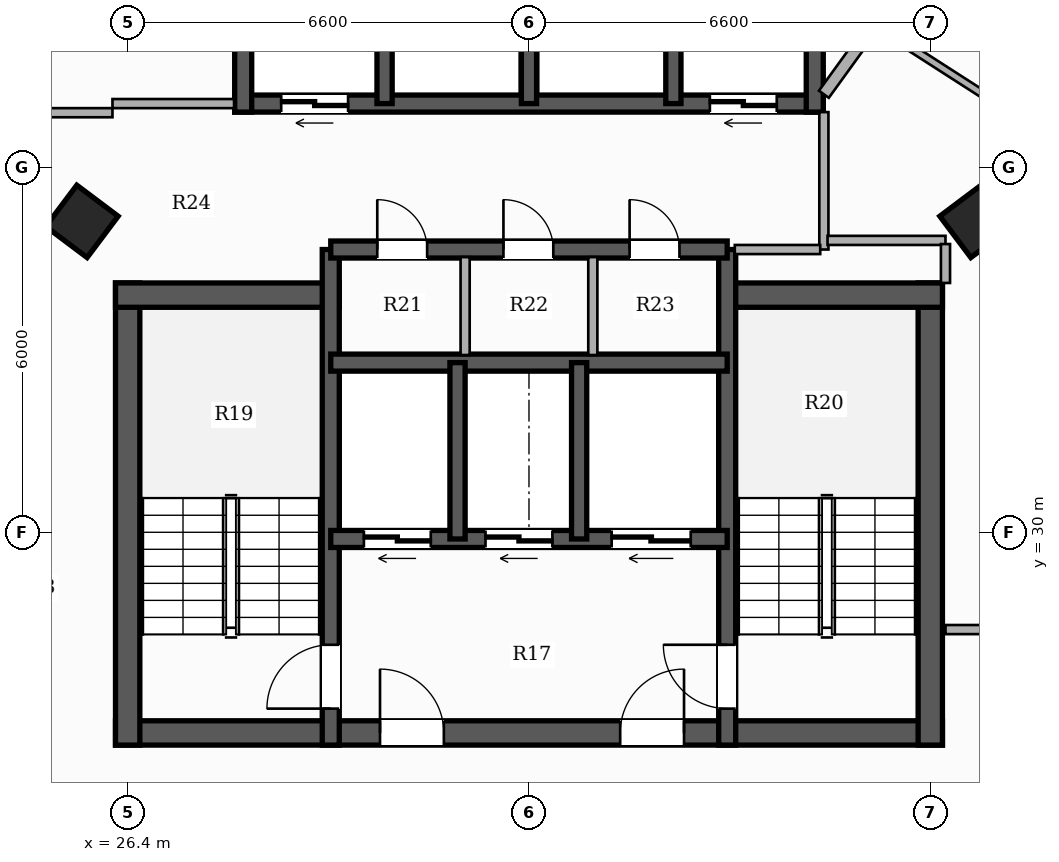
"""IFC4 building model, lengths in metres.
Left out: names, types, materials, properties, quantities, classifications, styles, units other than length and angle.
Written with IfcOpenShell. Run it as: python <this file> out.ifc"""

import sys

from ifc_helpers import new_model, si_unit, direction, frame, frame_2d, origin, origin_2d, place, context, subcontext, project, spatial, rectangle, hollow_rectangle, extrude, element, fill, save


model = new_model("IFC4")
c1 = context("Model", 3, precision=1e-05, world=origin(), true_north=direction((0.0, 1.0)))
c2 = subcontext(c1, "Body", "Model", "MODEL_VIEW")
j1 = project(units=[si_unit("LENGTHUNIT", "METRE"), si_unit("PLANEANGLEUNIT", "RADIAN")], contexts=[c1])
p1 = place(None, origin())
s1 = spatial("IfcSite", under=j1, at=p1, CompositionType="ELEMENT")
p2 = place(p1, origin())
s2 = spatial("IfcBuilding", under=s1, at=p2, CompositionType="ELEMENT")
p3 = place(p2, frame((0.0, 0.0, 177.05)))
s3 = spatial("IfcBuildingStorey", under=s2, at=p3, CompositionType="ELEMENT", Elevation=177.05)
p4 = place(p3, frame((26.2, 26.7, 0.0), z_axis=(0.0, 0.0, 1.0), x_axis=(1.0, 0.0, 0.0)))
e1 = element("IfcWall", 1, at=p4, inside=s3, PredefinedType="SHEAR", context=c2, shape_type="SweptSolid", body=[
    extrude(rectangle(XDim=13.6, YDim=0.4, at=frame_2d((6.8, 0.0))), origin(), (0.0, 0.0, 1.0), 3.3),
])
p5 = place(p4, frame((4.35, 0.0, 0.0)))
e2 = element("IfcOpeningElement", 2, at=p5, cuts=e1, PredefinedType="OPENING", context=c2, shape_type="SweptSolid", body=[
    extrude(rectangle(XDim=1.05, YDim=2.15, at=frame_2d((0.525, 1.075))), frame((0.0, 0.21, 0.0), z_axis=(0.0, -1.0, 0.0), x_axis=(1.0, 0.0, 0.0)), (0.0, 0.0, 1.0), 0.42),
])
p6 = place(p4, frame((8.3, 0.0, 0.0)))
e3 = element("IfcOpeningElement", 3, at=p6, cuts=e1, PredefinedType="OPENING", context=c2, shape_type="SweptSolid", body=[
    extrude(rectangle(XDim=1.05, YDim=2.15, at=frame_2d((0.525, 1.075))), frame((0.0, 0.21, 0.0), z_axis=(0.0, -1.0, 0.0), x_axis=(1.0, 0.0, 0.0)), (0.0, 0.0, 1.0), 0.42),
])
p7 = place(p3, frame((26.4, 26.5, 0.0), z_axis=(0.0, 0.0, 1.0), x_axis=(0.0, 1.0, 0.0)))
e4 = element("IfcWall", 4, at=p7, inside=s3, PredefinedType="SHEAR", context=c2, shape_type="SweptSolid", body=[
    extrude(rectangle(XDim=7.6, YDim=0.4, at=frame_2d((3.8, 0.0))), origin(), (0.0, 0.0, 1.0), 3.3),
])
p8 = place(p3, frame((26.2, 33.9, 0.0), z_axis=(0.0, 0.0, 1.0), x_axis=(1.0, 0.0, 0.0)))
e5 = element("IfcWall", 5, at=p8, inside=s3, PredefinedType="SHEAR", context=c2, shape_type="SweptSolid", body=[
    extrude(rectangle(XDim=3.68, YDim=0.4, at=frame_2d((1.84, 0.0))), origin(), (0.0, 0.0, 1.0), 3.3),
])
p9 = place(p3, frame((39.6, 26.5, 0.0), z_axis=(0.0, 0.0, 1.0), x_axis=(0.0, 1.0, 0.0)))
e6 = element("IfcWall", 6, at=p9, inside=s3, PredefinedType="SHEAR", context=c2, shape_type="SweptSolid", body=[
    extrude(rectangle(XDim=7.6, YDim=0.4, at=frame_2d((3.8, 0.0))), origin(), (0.0, 0.0, 1.0), 3.3),
])
p10 = place(p3, frame((36.12, 33.9, 0.0), z_axis=(0.0, 0.0, 1.0), x_axis=(1.0, 0.0, 0.0)))
e7 = element("IfcWall", 7, at=p10, inside=s3, PredefinedType="SHEAR", context=c2, shape_type="SweptSolid", body=[
    extrude(rectangle(XDim=3.68, YDim=0.4, at=frame_2d((1.84, 0.0))), origin(), (0.0, 0.0, 1.0), 3.3),
])
p11 = place(p3, frame((29.74, 26.5, 0.0), z_axis=(0.0, 0.0, 1.0), x_axis=(0.0, 1.0, 0.0)))
e8 = element("IfcWall", 8, at=p11, inside=s3, PredefinedType="SHEAR", context=c2, shape_type="SweptSolid", body=[
    extrude(rectangle(XDim=8.15, YDim=0.28, at=frame_2d((4.075, 0.0))), origin(), (0.0, 0.0, 1.0), 3.3),
])
p12 = place(p11, frame((0.6, 0.0, 0.0)))
e9 = element("IfcOpeningElement", 9, at=p12, cuts=e8, PredefinedType="OPENING", context=c2, shape_type="SweptSolid", body=[
    extrude(rectangle(XDim=1.05, YDim=2.15, at=frame_2d((0.525, 1.075))), frame((0.0, 0.15, 0.0), z_axis=(0.0, -1.0, 0.0), x_axis=(1.0, 0.0, 0.0)), (0.0, 0.0, 1.0), 0.3),
])
p13 = place(p3, frame((36.26, 26.5, 0.0), z_axis=(0.0, 0.0, 1.0), x_axis=(0.0, 1.0, 0.0)))
e10 = element("IfcWall", 10, at=p13, inside=s3, PredefinedType="SHEAR", context=c2, shape_type="SweptSolid", body=[
    extrude(rectangle(XDim=8.15, YDim=0.28, at=frame_2d((4.075, 0.0))), origin(), (0.0, 0.0, 1.0), 3.3),
])
p14 = place(p13, frame((0.6, 0.0, 0.0)))
e11 = element("IfcOpeningElement", 11, at=p14, cuts=e10, PredefinedType="OPENING", context=c2, shape_type="SweptSolid", body=[
    extrude(rectangle(XDim=1.05, YDim=2.15, at=frame_2d((0.525, 1.075))), frame((0.0, 0.15, 0.0), z_axis=(0.0, -1.0, 0.0), x_axis=(1.0, 0.0, 0.0)), (0.0, 0.0, 1.0), 0.3),
])
p15 = place(p3, frame((36.26, 29.89, 0.0), z_axis=(0.0, 0.0, 1.0), x_axis=(-1.0, 0.0, 0.0)))
e12 = element("IfcWall", 12, at=p15, inside=s3, PredefinedType="SHEAR", context=c2, shape_type="SweptSolid", body=[
    extrude(rectangle(XDim=6.52, YDim=0.28, at=frame_2d((3.26, 0.0))), origin(), (0.0, 0.0, 1.0), 3.3),
])
p16 = place(p15, frame((4.875, 0.0, 0.0)))
e13 = element("IfcOpeningElement", 13, at=p16, cuts=e12, PredefinedType="OPENING", context=c2, shape_type="SweptSolid", body=[
    extrude(rectangle(XDim=1.1, YDim=2.2, at=frame_2d((0.55, 1.1))), frame((0.0, 0.15, 0.0), z_axis=(0.0, -1.0, 0.0), x_axis=(1.0, 0.0, 0.0)), (0.0, 0.0, 1.0), 0.3),
])
p17 = place(p15, frame((2.875, 0.0, 0.0)))
e14 = element("IfcOpeningElement", 14, at=p17, cuts=e12, PredefinedType="OPENING", context=c2, shape_type="SweptSolid", body=[
    extrude(rectangle(XDim=1.1, YDim=2.2, at=frame_2d((0.55, 1.1))), frame((0.0, 0.15, 0.0), z_axis=(0.0, -1.0, 0.0), x_axis=(1.0, 0.0, 0.0)), (0.0, 0.0, 1.0), 0.3),
])
p18 = place(p15, frame((0.6, 0.0, 0.0)))
e15 = element("IfcOpeningElement", 15, at=p18, cuts=e12, PredefinedType="OPENING", context=c2, shape_type="SweptSolid", body=[
    extrude(rectangle(XDim=1.3, YDim=2.2, at=frame_2d((0.65, 1.1))), frame((0.0, 0.15, 0.0), z_axis=(0.0, -1.0, 0.0), x_axis=(1.0, 0.0, 0.0)), (0.0, 0.0, 1.0), 0.3),
])
p19 = place(p3, frame((29.74, 32.79, 0.0), z_axis=(0.0, 0.0, 1.0), x_axis=(1.0, 0.0, 0.0)))
e16 = element("IfcWall", 16, at=p19, inside=s3, PredefinedType="SHEAR", context=c2, shape_type="SweptSolid", body=[
    extrude(rectangle(XDim=6.52, YDim=0.28, at=frame_2d((3.26, 0.0))), origin(), (0.0, 0.0, 1.0), 3.3),
])
for number, where, z_axis, x_axis in (
    (17, (31.825, 29.89, 0.0), (0.0, 0.0, 1.0), (0.0, 1.0, 0.0)),
    (18, (33.825, 29.89, 0.0), (0.0, 0.0, 1.0), (0.0, 1.0, 0.0)),
):
    element("IfcWall", number, at=place(p3, frame(where, z_axis=z_axis, x_axis=x_axis)), inside=s3, PredefinedType="SHEAR", context=c2, shape_type="SweptSolid", body=[
        extrude(rectangle(XDim=2.9, YDim=0.25, at=frame_2d((1.45, 0.0))), origin(), (0.0, 0.0, 1.0), 3.3),
    ])
p20 = place(p3, frame((29.74, 34.65, 0.0), z_axis=(0.0, 0.0, 1.0), x_axis=(1.0, 0.0, 0.0)))
e19 = element("IfcWall", 19, at=p20, inside=s3, PredefinedType="SHEAR", context=c2, shape_type="SweptSolid", body=[
    extrude(rectangle(XDim=6.52, YDim=0.28, at=frame_2d((3.26, 0.0))), origin(), (0.0, 0.0, 1.0), 3.3),
])
p21 = place(p20, frame((0.765, 0.0, 0.0)))
e20 = element("IfcOpeningElement", 20, at=p21, cuts=e19, PredefinedType="OPENING", context=c2, shape_type="SweptSolid", body=[
    extrude(rectangle(XDim=0.82, YDim=2.1, at=frame_2d((0.41, 1.05))), frame((0.0, 0.15, 0.0), z_axis=(0.0, -1.0, 0.0), x_axis=(1.0, 0.0, 0.0)), (0.0, 0.0, 1.0), 0.3),
])
p22 = place(p20, frame((2.84, 0.0, 0.0)))
e21 = element("IfcOpeningElement", 21, at=p22, cuts=e19, PredefinedType="OPENING", context=c2, shape_type="SweptSolid", body=[
    extrude(rectangle(XDim=0.82, YDim=2.1, at=frame_2d((0.41, 1.05))), frame((0.0, 0.15, 0.0), z_axis=(0.0, -1.0, 0.0), x_axis=(1.0, 0.0, 0.0)), (0.0, 0.0, 1.0), 0.3),
])
p23 = place(p20, frame((4.915, 0.0, 0.0)))
e22 = element("IfcOpeningElement", 22, at=p23, cuts=e19, PredefinedType="OPENING", context=c2, shape_type="SweptSolid", body=[
    extrude(rectangle(XDim=0.82, YDim=2.1, at=frame_2d((0.41, 1.05))), frame((0.0, 0.15, 0.0), z_axis=(0.0, -1.0, 0.0), x_axis=(1.0, 0.0, 0.0)), (0.0, 0.0, 1.0), 0.3),
])
p24 = place(p3, frame((37.84, 37.05, 0.0), z_axis=(0.0, 0.0, 1.0), x_axis=(-1.0, 0.0, 0.0)))
e23 = element("IfcWall", 23, at=p24, inside=s3, PredefinedType="SHEAR", context=c2, shape_type="SweptSolid", body=[
    extrude(rectangle(XDim=9.68, YDim=0.28, at=frame_2d((4.84, 0.0))), origin(), (0.0, 0.0, 1.0), 3.3),
])
p25 = place(p24, frame((7.815, 0.0, 0.0)))
e24 = element("IfcOpeningElement", 24, at=p25, cuts=e23, PredefinedType="OPENING", context=c2, shape_type="SweptSolid", body=[
    extrude(rectangle(XDim=1.1, YDim=2.2, at=frame_2d((0.55, 1.1))), frame((0.0, 0.15, 0.0), z_axis=(0.0, -1.0, 0.0), x_axis=(1.0, 0.0, 0.0)), (0.0, 0.0, 1.0), 0.3),
])
p26 = place(p24, frame((0.765, 0.0, 0.0)))
e25 = element("IfcOpeningElement", 25, at=p26, cuts=e23, PredefinedType="OPENING", context=c2, shape_type="SweptSolid", body=[
    extrude(rectangle(XDim=1.1, YDim=2.2, at=frame_2d((0.55, 1.1))), frame((0.0, 0.15, 0.0), z_axis=(0.0, -1.0, 0.0), x_axis=(1.0, 0.0, 0.0)), (0.0, 0.0, 1.0), 0.3),
])
for number, where, z_axis, x_axis in (
    (26, (28.3, 36.91, 0.0), (0.0, 0.0, 1.0), (0.0, 1.0, 0.0)),
    (27, (37.7, 36.91, 0.0), (0.0, 0.0, 1.0), (0.0, 1.0, 0.0)),
):
    element("IfcWall", number, at=place(p3, frame(where, z_axis=z_axis, x_axis=x_axis)), inside=s3, PredefinedType="SHEAR", context=c2, shape_type="SweptSolid", body=[
        extrude(rectangle(XDim=2.83, YDim=0.28, at=frame_2d((1.415, 0.0))), origin(), (0.0, 0.0, 1.0), 3.3),
    ])
for number, where, z_axis, x_axis in (
    (28, (30.625, 37.05, 0.0), (0.0, 0.0, 1.0), (0.0, 1.0, 0.0)),
    (29, (33.0, 37.05, 0.0), (0.0, 0.0, 1.0), (0.0, 1.0, 0.0)),
    (30, (35.375, 37.05, 0.0), (0.0, 0.0, 1.0), (0.0, 1.0, 0.0)),
):
    element("IfcWall", number, at=place(p3, frame(where, z_axis=z_axis, x_axis=x_axis)), inside=s3, PredefinedType="SHEAR", context=c2, shape_type="SweptSolid", body=[
        extrude(rectangle(XDim=2.55, YDim=0.25, at=frame_2d((1.275, 0.0))), origin(), (0.0, 0.0, 1.0), 3.3),
    ])
for number, where, z_axis, x_axis in (
    (31, (25.648, 35.113, 0.0), (0.0, 0.0, 1.0), (0.6, 0.8, 0.0)),
    (32, (40.352, 35.113, 0.0), (0.0, 0.0, 1.0), (-0.6, 0.8, 0.0)),
):
    element("IfcColumn", number, at=place(p3, frame(where, z_axis=z_axis, x_axis=x_axis)), inside=s3, PredefinedType="COLUMN", context=c2, shape_type="SweptSolid", body=[
        extrude(hollow_rectangle(XDim=0.85, YDim=0.85, WallThickness=0.028, at=origin_2d()), origin(), (0.0, 0.0, 1.0), 3.3),
    ])
p27 = place(p3, frame((37.85, 34.65, 0.0), z_axis=(0.0, 0.0, 1.0), x_axis=(0.0, 1.0, 0.0)))
e33 = element("IfcWall", 33, at=p27, inside=s3, PredefinedType="PARTITIONING", context=c2, shape_type="SweptSolid", body=[
    extrude(rectangle(XDim=2.26, YDim=0.15, at=frame_2d((1.13, 0.0))), origin(), (0.0, 0.0, 1.0), 3.06),
])
p28 = place(p3, frame((36.385, 34.65, 0.0), z_axis=(0.0, 0.0, 1.0), x_axis=(1.0, 0.0, 0.0)))
e34 = element("IfcWall", 34, at=p28, inside=s3, PredefinedType="PARTITIONING", context=c2, shape_type="SweptSolid", body=[
    extrude(rectangle(XDim=1.405, YDim=0.15, at=frame_2d((0.703, 0.0))), origin(), (0.0, 0.0, 1.0), 2.425),
])
for number, where, z_axis, x_axis in (
    (35, (31.95, 32.915, 0.0), (0.0, 0.0, 1.0), (0.0, 1.0, 0.0)),
    (36, (34.05, 32.915, 0.0), (0.0, 0.0, 1.0), (0.0, 1.0, 0.0)),
):
    element("IfcWall", number, at=place(p3, frame(where, z_axis=z_axis, x_axis=x_axis)), inside=s3, PredefinedType="PARTITIONING", context=c2, shape_type="SweptSolid", body=[
        extrude(rectangle(XDim=1.61, YDim=0.15, at=frame_2d((0.805, 0.0))), origin(), (0.0, 0.0, 1.0), 3.06),
    ])
p29 = place(p3, frame((23.56, 36.9, 0.0), z_axis=(0.0, 0.0, 1.0), x_axis=(1.0, 0.0, 0.0)))
e37 = element("IfcWall", 37, at=p29, inside=s3, PredefinedType="PARTITIONING", context=c2, shape_type="SweptSolid", body=[
    extrude(rectangle(XDim=2.59, YDim=0.15, at=frame_2d((1.295, 0.0))), origin(), (0.0, 0.0, 1.0), 2.413),
])
p30 = place(p29, frame((0.515, 0.0, 0.0)))
e38 = element("IfcOpeningElement", 38, at=p30, cuts=e37, PredefinedType="OPENING", context=c2, shape_type="SweptSolid", body=[
    extrude(rectangle(XDim=0.88, YDim=2.1, at=frame_2d((0.44, 1.05))), frame((0.0, 0.085, 0.0), z_axis=(0.0, -1.0, 0.0), x_axis=(1.0, 0.0, 0.0)), (0.0, 0.0, 1.0), 0.17),
])
p31 = place(p3, frame((39.85, 28.4, 0.0), z_axis=(0.0, 0.0, 1.0), x_axis=(1.0, 0.0, 0.0)))
e39 = element("IfcWall", 39, at=p31, inside=s3, PredefinedType="PARTITIONING", context=c2, shape_type="SweptSolid", body=[
    extrude(rectangle(XDim=2.5, YDim=0.15, at=frame_2d((1.25, 0.0))), origin(), (0.0, 0.0, 1.0), 2.721),
])
p32 = place(p3, frame((26.15, 37.05, 0.0), z_axis=(0.0, 0.0, 1.0), x_axis=(1.0, 0.0, 0.0)))
e40 = element("IfcWall", 40, at=p32, inside=s3, PredefinedType="PARTITIONING", context=c2, shape_type="SweptSolid", body=[
    extrude(rectangle(XDim=2.0, YDim=0.15, at=frame_2d((1.0, 0.0))), origin(), (0.0, 0.0, 1.0), 2.413),
])
p33 = place(p3, frame((37.91, 34.8, 0.0), z_axis=(0.0, 0.0, 1.0), x_axis=(1.0, 0.0, 0.0)))
e41 = element("IfcWall", 41, at=p33, inside=s3, PredefinedType="PARTITIONING", context=c2, shape_type="SweptSolid", body=[
    extrude(rectangle(XDim=1.94, YDim=0.15, at=frame_2d((0.97, 0.0))), origin(), (0.0, 0.0, 1.0), 2.721),
])
p34 = place(p3, frame((39.85, 34.74, 0.0), z_axis=(0.0, 0.0, 1.0), x_axis=(0.0, -1.0, 0.0)))
e42 = element("IfcWall", 42, at=p34, inside=s3, PredefinedType="PARTITIONING", context=c2, shape_type="SweptSolid", body=[
    extrude(rectangle(XDim=0.64, YDim=0.15, at=frame_2d((0.32, 0.0))), origin(), (0.0, 0.0, 1.0), 2.721),
])
p35 = place(p3, frame((37.85, 37.203, 0.0), z_axis=(0.0, 0.0, 1.0), x_axis=(0.586236886407, 0.810139687348, 0.0)))
e43 = element("IfcWall", 43, at=p35, inside=s3, PredefinedType="PARTITIONING", context=c2, shape_type="SweptSolid", body=[
    extrude(rectangle(XDim=4.048, YDim=0.2, at=frame_2d((2.024, 0.0))), origin(), (0.0, 0.0, 1.0), 2.413),
])
p36 = place(p3, frame((38.752, 38.305, 0.0), z_axis=(0.0, 0.0, 1.0), x_axis=(0.84140799898, -0.54040038791, 0.0)))
e44 = element("IfcWall", 44, at=p36, inside=s3, PredefinedType="PARTITIONING", context=c2, shape_type="SweptSolid", body=[
    extrude(rectangle(XDim=7.013, YDim=0.12, at=frame_2d((3.507, 0.0))), origin(), (0.0, 0.0, 1.0), 2.413),
])
p37 = place(p36, frame((3.816, 0.0, 0.0)))
e45 = element("IfcOpeningElement", 45, at=p37, cuts=e44, PredefinedType="OPENING", context=c2, shape_type="SweptSolid", body=[
    extrude(rectangle(XDim=0.88, YDim=2.1, at=frame_2d((0.44, 1.05))), frame((0.0, 0.07, 0.0), z_axis=(0.0, -1.0, 0.0), x_axis=(1.0, 0.0, 0.0)), (0.0, 0.0, 1.0), 0.14),
])
p38 = place(p12, origin())
e46 = element("IfcDoor", 46, at=p38, inside=s3, OperationType="SINGLE_SWING_LEFT", PredefinedType="DOOR", context=c2, shape_type="SweptSolid", body=[
    extrude(rectangle(XDim=1.05, YDim=2.15, at=frame_2d((0.525, 1.075))), frame((0.0, 0.025, 0.0), z_axis=(0.0, -1.0, 0.0), x_axis=(1.0, 0.0, 0.0)), (0.0, 0.0, 1.0), 0.05),
])
fill(e9, e46)
p39 = place(p14, origin())
e47 = element("IfcDoor", 47, at=p39, inside=s3, OperationType="SINGLE_SWING_RIGHT", PredefinedType="DOOR", context=c2, shape_type="SweptSolid", body=[
    extrude(rectangle(XDim=1.05, YDim=2.15, at=frame_2d((0.525, 1.075))), frame((0.0, 0.025, 0.0), z_axis=(0.0, -1.0, 0.0), x_axis=(1.0, 0.0, 0.0)), (0.0, 0.0, 1.0), 0.05),
])
fill(e11, e47)
p40 = place(p5, origin())
e48 = element("IfcDoor", 48, at=p40, inside=s3, OperationType="SINGLE_SWING_LEFT", PredefinedType="DOOR", context=c2, shape_type="SweptSolid", body=[
    extrude(rectangle(XDim=1.05, YDim=2.15, at=frame_2d((0.525, 1.075))), frame((0.0, 0.025, 0.0), z_axis=(0.0, -1.0, 0.0), x_axis=(1.0, 0.0, 0.0)), (0.0, 0.0, 1.0), 0.05),
])
fill(e2, e48)
p41 = place(p6, origin())
e49 = element("IfcDoor", 49, at=p41, inside=s3, OperationType="SINGLE_SWING_RIGHT", PredefinedType="DOOR", context=c2, shape_type="SweptSolid", body=[
    extrude(rectangle(XDim=1.05, YDim=2.15, at=frame_2d((0.525, 1.075))), frame((0.0, 0.025, 0.0), z_axis=(0.0, -1.0, 0.0), x_axis=(1.0, 0.0, 0.0)), (0.0, 0.0, 1.0), 0.05),
])
fill(e3, e49)
p42 = place(p16, origin())
e50 = element("IfcDoor", 50, at=p42, inside=s3, OperationType="DOUBLE_DOOR_SLIDING", PredefinedType="DOOR", context=c2, shape_type="SweptSolid", body=[
    extrude(rectangle(XDim=1.1, YDim=2.2, at=frame_2d((0.55, 1.1))), frame((0.0, 0.025, 0.0), z_axis=(0.0, -1.0, 0.0), x_axis=(1.0, 0.0, 0.0)), (0.0, 0.0, 1.0), 0.05),
])
fill(e13, e50)
p43 = place(p17, origin())
e51 = element("IfcDoor", 51, at=p43, inside=s3, OperationType="DOUBLE_DOOR_SLIDING", PredefinedType="DOOR", context=c2, shape_type="SweptSolid", body=[
    extrude(rectangle(XDim=1.1, YDim=2.2, at=frame_2d((0.55, 1.1))), frame((0.0, 0.025, 0.0), z_axis=(0.0, -1.0, 0.0), x_axis=(1.0, 0.0, 0.0)), (0.0, 0.0, 1.0), 0.05),
])
fill(e14, e51)
p44 = place(p18, origin())
e52 = element("IfcDoor", 52, at=p44, inside=s3, OperationType="DOUBLE_DOOR_SLIDING", PredefinedType="DOOR", context=c2, shape_type="SweptSolid", body=[
    extrude(rectangle(XDim=1.3, YDim=2.2, at=frame_2d((0.65, 1.1))), frame((0.0, 0.025, 0.0), z_axis=(0.0, -1.0, 0.0), x_axis=(1.0, 0.0, 0.0)), (0.0, 0.0, 1.0), 0.05),
])
fill(e15, e52)
p45 = place(p25, origin())
e53 = element("IfcDoor", 53, at=p45, inside=s3, OperationType="DOUBLE_DOOR_SLIDING", PredefinedType="DOOR", context=c2, shape_type="SweptSolid", body=[
    extrude(rectangle(XDim=1.1, YDim=2.2, at=frame_2d((0.55, 1.1))), frame((0.0, 0.025, 0.0), z_axis=(0.0, -1.0, 0.0), x_axis=(1.0, 0.0, 0.0)), (0.0, 0.0, 1.0), 0.05),
])
fill(e24, e53)
p46 = place(p26, origin())
e54 = element("IfcDoor", 54, at=p46, inside=s3, OperationType="DOUBLE_DOOR_SLIDING", PredefinedType="DOOR", context=c2, shape_type="SweptSolid", body=[
    extrude(rectangle(XDim=1.1, YDim=2.2, at=frame_2d((0.55, 1.1))), frame((0.0, 0.025, 0.0), z_axis=(0.0, -1.0, 0.0), x_axis=(1.0, 0.0, 0.0)), (0.0, 0.0, 1.0), 0.05),
])
fill(e25, e54)
p47 = place(p21, origin())
e55 = element("IfcDoor", 55, at=p47, inside=s3, OperationType="SINGLE_SWING_LEFT", PredefinedType="DOOR", context=c2, shape_type="SweptSolid", body=[
    extrude(rectangle(XDim=0.82, YDim=2.1, at=frame_2d((0.41, 1.05))), frame((0.0, 0.025, 0.0), z_axis=(0.0, -1.0, 0.0), x_axis=(1.0, 0.0, 0.0)), (0.0, 0.0, 1.0), 0.05),
])
fill(e20, e55)
p48 = place(p22, origin())
e56 = element("IfcDoor", 56, at=p48, inside=s3, OperationType="SINGLE_SWING_LEFT", PredefinedType="DOOR", context=c2, shape_type="SweptSolid", body=[
    extrude(rectangle(XDim=0.82, YDim=2.1, at=frame_2d((0.41, 1.05))), frame((0.0, 0.025, 0.0), z_axis=(0.0, -1.0, 0.0), x_axis=(1.0, 0.0, 0.0)), (0.0, 0.0, 1.0), 0.05),
])
fill(e21, e56)
p49 = place(p23, origin())
e57 = element("IfcDoor", 57, at=p49, inside=s3, OperationType="SINGLE_SWING_LEFT", PredefinedType="DOOR", context=c2, shape_type="SweptSolid", body=[
    extrude(rectangle(XDim=0.82, YDim=2.1, at=frame_2d((0.41, 1.05))), frame((0.0, 0.025, 0.0), z_axis=(0.0, -1.0, 0.0), x_axis=(1.0, 0.0, 0.0)), (0.0, 0.0, 1.0), 0.05),
])
fill(e22, e57)
save(model, sys.argv[1])
